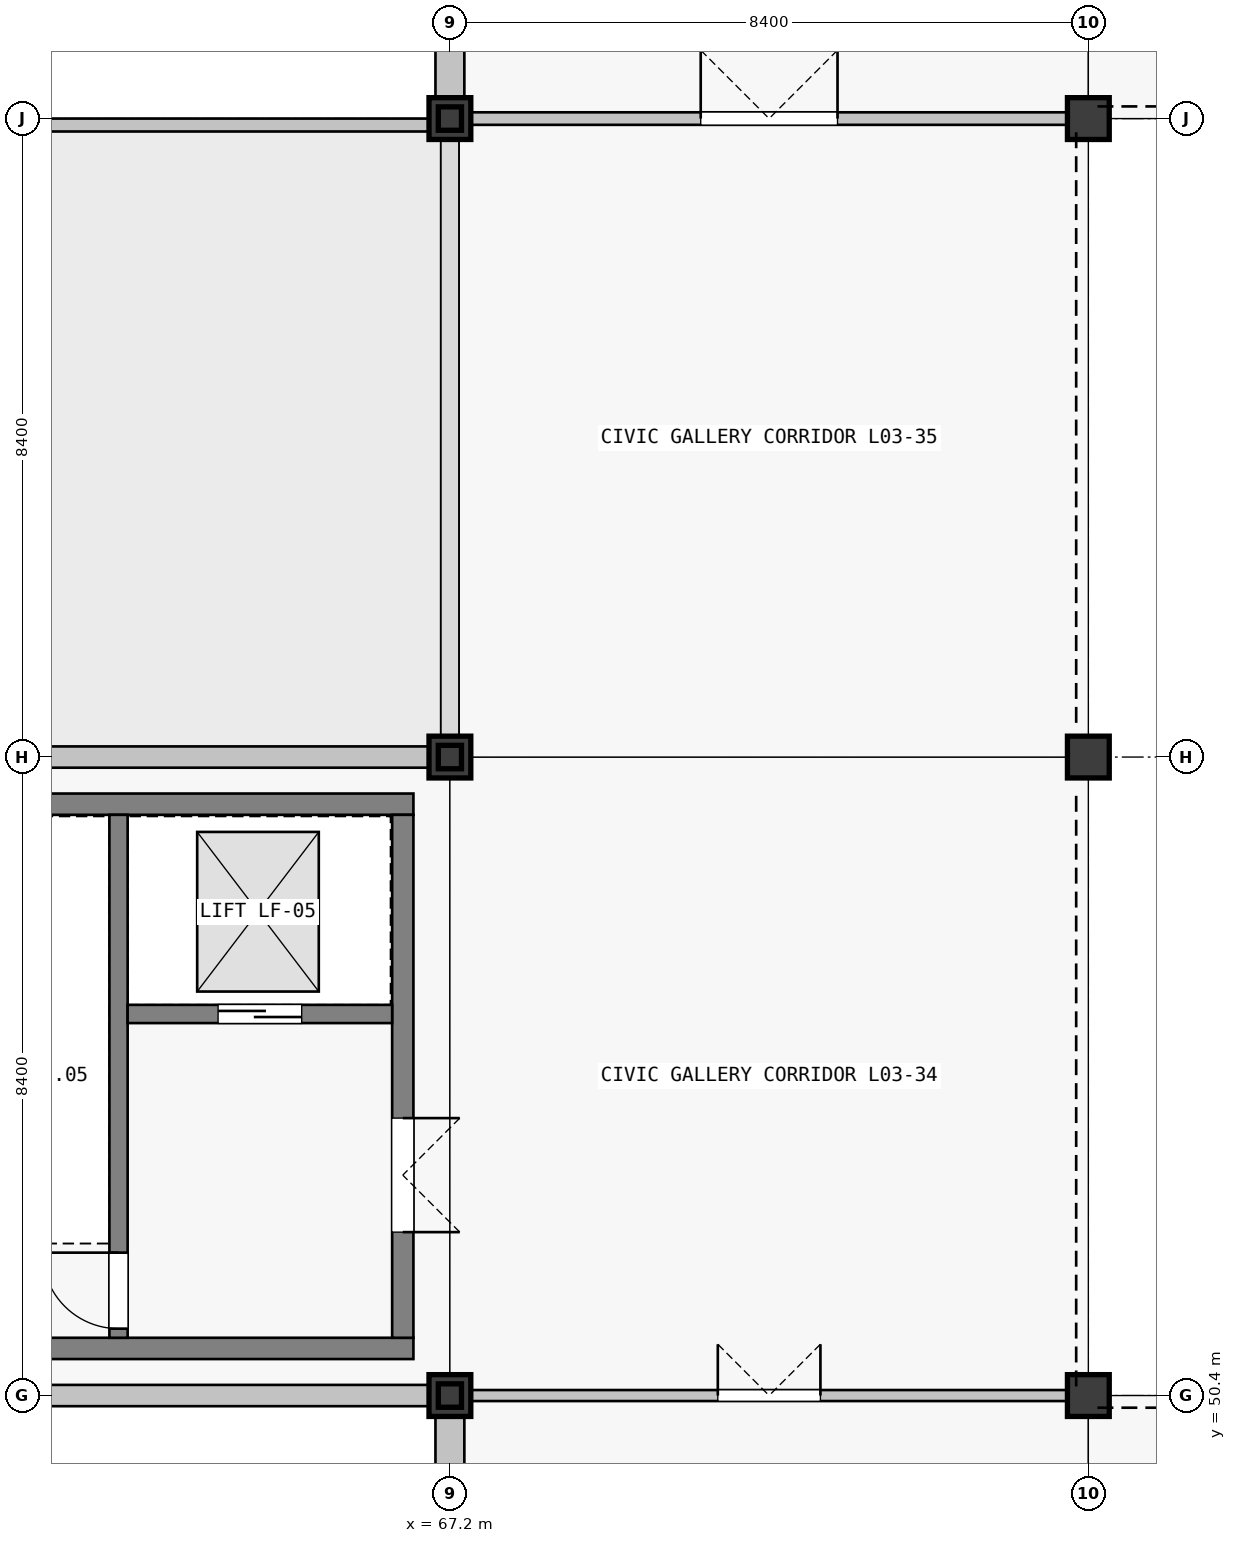
"""IFC4 building model, lengths in metres.
Left out: names, types, materials, properties, quantities, classifications, styles, units other than length and angle.
Written with IfcOpenShell. Run it as: python <this file> out.ifc"""

import sys

from ifc_helpers import new_model, si_unit, direction, frame, frame_2d, origin, origin_2d, place, context, subcontext, project, spatial, rectangle, i_section, extrude, element, fill, save


model = new_model("IFC4")
c1 = context("Model", 3, precision=1e-05, world=origin(), true_north=direction((0.0, 1.0)))
c2 = subcontext(c1, "Body", "Model", "MODEL_VIEW")
j1 = project(units=[si_unit("LENGTHUNIT", "METRE"), si_unit("PLANEANGLEUNIT", "RADIAN")], contexts=[c1])
p1 = place(None, origin())
s1 = spatial("IfcSite", under=j1, at=p1, CompositionType="ELEMENT")
p2 = place(p1, origin())
s2 = spatial("IfcBuilding", under=s1, at=p2, CompositionType="ELEMENT")
p3 = place(p2, frame((0.0, 0.0, 14.76)))
s3 = spatial("IfcBuildingStorey", under=s2, at=p3, CompositionType="ELEMENT", Elevation=14.76)
for number, where, z_axis, x_axis in (
    (1, (67.2, 50.4, 0.0), (0.0, 0.0, 1.0), (1.0, 0.0, 0.0)),
    (2, (67.2, 58.8, 0.0), (0.0, 0.0, 1.0), (1.0, 0.0, 0.0)),
    (3, (67.2, 67.2, 0.0), (0.0, 0.0, 1.0), (1.0, 0.0, 0.0)),
    (4, (75.6, 50.4, 0.0), (0.0, 0.0, 1.0), (1.0, 0.0, 0.0)),
    (5, (75.6, 58.8, 0.0), (0.0, 0.0, 1.0), (1.0, 0.0, 0.0)),
    (6, (75.6, 67.2, 0.0), (0.0, 0.0, 1.0), (1.0, 0.0, 0.0)),
):
    element("IfcColumn", number, at=place(p3, frame(where, z_axis=z_axis, x_axis=x_axis)), inside=s3, PredefinedType="COLUMN", context=c2, shape_type="SweptSolid", body=[
        extrude(rectangle(XDim=0.55, YDim=0.55, at=origin_2d()), origin(), (0.0, 0.0, 1.0), 4.14),
    ])
p4 = place(p3, frame((67.2, 50.4, 4.14), z_axis=(0.0, 0.0, 1.0), x_axis=(1.0, 0.0, 0.0)))
e7 = element("IfcColumn", 7, at=p4, inside=s3, PredefinedType="COLUMN", context=c2, shape_type="SweptSolid", body=[
    extrude(i_section(OverallWidth=0.305, OverallDepth=0.308, WebThickness=0.01, FlangeThickness=0.015, FilletRadius=0.017, at=origin_2d()), origin(), (0.0, 0.0, 1.0), 1.709),
])
p5 = place(p3, frame((67.2, 58.8, 4.14), z_axis=(0.0, 0.0, 1.0), x_axis=(1.0, 0.0, 0.0)))
e8 = element("IfcColumn", 8, at=p5, inside=s3, PredefinedType="COLUMN", context=c2, shape_type="SweptSolid", body=[
    extrude(i_section(OverallWidth=0.305, OverallDepth=0.308, WebThickness=0.01, FlangeThickness=0.015, FilletRadius=0.017, at=origin_2d()), origin(), (0.0, 0.0, 1.0), 2.558),
])
p6 = place(p3, frame((67.2, 67.2, 4.14), z_axis=(0.0, 0.0, 1.0), x_axis=(1.0, 0.0, 0.0)))
e9 = element("IfcColumn", 9, at=p6, inside=s3, PredefinedType="COLUMN", context=c2, shape_type="SweptSolid", body=[
    extrude(i_section(OverallWidth=0.305, OverallDepth=0.308, WebThickness=0.01, FlangeThickness=0.015, FilletRadius=0.017, at=origin_2d()), origin(), (0.0, 0.0, 1.0), 1.709),
])
for number, where, z_axis, x_axis in (
    (10, (66.924, 50.4, 0.0), (0.0, 0.0, 1.0), (-1.0, 0.0, 0.0)),
    (11, (59.076, 58.8, 0.0), (0.0, 0.0, 1.0), (1.0, 0.0, 0.0)),
):
    element("IfcWall", number, at=place(p3, frame(where, z_axis=z_axis, x_axis=x_axis)), inside=s3, PredefinedType="SOLIDWALL", context=c2, shape_type="SweptSolid", body=[
        extrude(rectangle(XDim=7.848, YDim=0.28, at=frame_2d((3.924, 0.0))), origin(), (0.0, 0.0, 1.0), 3.37),
    ])
p7 = place(p3, frame((67.2, 42.276, 0.0), z_axis=(0.0, 0.0, 1.0), x_axis=(0.0, 1.0, 0.0)))
e12 = element("IfcWall", 12, at=p7, inside=s3, PredefinedType="SOLIDWALL", context=c2, shape_type="SweptSolid", body=[
    extrude(rectangle(XDim=7.848, YDim=0.38, at=frame_2d((3.924, 0.0))), origin(), (0.0, 0.0, 1.0), 2.52),
])
p8 = place(p3, frame((67.2, 67.476, 0.0), z_axis=(0.0, 0.0, 1.0), x_axis=(0.0, 1.0, 0.0)))
e13 = element("IfcWall", 13, at=p8, inside=s3, PredefinedType="SOLIDWALL", context=c2, shape_type="SweptSolid", body=[
    extrude(rectangle(XDim=7.848, YDim=0.38, at=frame_2d((3.924, 0.0))), origin(), (0.0, 0.0, 1.0), 2.52),
])
p9 = place(p3, frame((59.06, 67.115, 0.0), z_axis=(0.0, 0.0, 1.0), x_axis=(1.0, 0.0, 0.0)))
e14 = element("IfcWall", 14, at=p9, inside=s3, PredefinedType="PARAPET", context=c2, shape_type="SweptSolid", body=[
    extrude(rectangle(XDim=7.88, YDim=0.17, at=frame_2d((3.94, 0.0))), origin(), (0.0, 0.0, 1.0), 0.95),
])
for number, where, z_axis, x_axis in (
    (15, (66.72, 51.02, 0.0), (0.0, 0.0, 1.0), (-1.0, 0.0, 0.0)),
    (16, (59.28, 58.18, 0.0), (0.0, 0.0, 1.0), (1.0, 0.0, 0.0)),
):
    element("IfcWall", number, at=place(p3, frame(where, z_axis=z_axis, x_axis=x_axis)), inside=s3, PredefinedType="SHEAR", context=c2, shape_type="SweptSolid", body=[
        extrude(rectangle(XDim=7.44, YDim=0.28, at=frame_2d((3.72, 0.0))), origin(), (0.0, 0.0, 1.0), 4.07),
    ])
p10 = place(p3, frame((66.58, 58.04, 0.0), z_axis=(0.0, 0.0, 1.0), x_axis=(0.0, -1.0, 0.0)))
e17 = element("IfcWall", 17, at=p10, inside=s3, PredefinedType="SHEAR", context=c2, shape_type="SweptSolid", body=[
    extrude(rectangle(XDim=6.88, YDim=0.28, at=frame_2d((3.44, 0.0))), origin(), (0.0, 0.0, 1.0), 4.07),
])
p11 = place(p10, frame((3.99, 0.0, 0.0)))
e18 = element("IfcOpeningElement", 18, at=p11, cuts=e17, PredefinedType="OPENING", context=c2, shape_type="SweptSolid", body=[
    extrude(rectangle(XDim=1.5, YDim=2.15, at=frame_2d((0.75, 1.075))), frame((0.0, 0.14, 0.0), z_axis=(0.0, -1.0, 0.0), x_axis=(1.0, 0.0, 0.0)), (0.0, 0.0, 1.0), 0.28),
])
p12 = place(p3, frame((62.84, 51.16, 0.0), z_axis=(0.0, 0.0, 1.0), x_axis=(0.0, 1.0, 0.0)))
e19 = element("IfcWall", 19, at=p12, inside=s3, PredefinedType="SHEAR", context=c2, shape_type="SweptSolid", body=[
    extrude(rectangle(XDim=6.88, YDim=0.24, at=frame_2d((3.44, 0.0))), origin(), (0.0, 0.0, 1.0), 4.07),
])
p13 = place(p12, frame((0.12, 0.0, 0.0)))
e20 = element("IfcOpeningElement", 20, at=p13, cuts=e19, PredefinedType="OPENING", context=c2, shape_type="SweptSolid", body=[
    extrude(rectangle(XDim=1.0, YDim=2.15, at=frame_2d((0.5, 1.075))), frame((0.0, 0.12, 0.0), z_axis=(0.0, -1.0, 0.0), x_axis=(1.0, 0.0, 0.0)), (0.0, 0.0, 1.0), 0.24),
])
p14 = place(p3, frame((62.96, 55.42, 0.0), z_axis=(0.0, 0.0, 1.0), x_axis=(1.0, 0.0, 0.0)))
e21 = element("IfcWall", 21, at=p14, inside=s3, PredefinedType="SHEAR", context=c2, shape_type="SweptSolid", body=[
    extrude(rectangle(XDim=3.48, YDim=0.24, at=frame_2d((1.74, 0.0))), origin(), (0.0, 0.0, 1.0), 4.07),
])
p15 = place(p14, frame((1.19, 0.0, 0.0)))
e22 = element("IfcOpeningElement", 22, at=p15, cuts=e21, PredefinedType="OPENING", context=c2, shape_type="SweptSolid", body=[
    extrude(rectangle(XDim=1.1, YDim=2.15, at=frame_2d((0.55, 1.075))), frame((0.0, 0.12, 0.0), z_axis=(0.0, -1.0, 0.0), x_axis=(1.0, 0.0, 0.0)), (0.0, 0.0, 1.0), 0.24),
])
p16 = place(p3, frame((67.477, 50.4, 0.0), z_axis=(0.0, 0.0, 1.0), x_axis=(1.0, 0.0, 0.0)))
e23 = element("IfcWall", 23, at=p16, inside=s3, PredefinedType="PARTITIONING", context=c2, shape_type="SweptSolid", body=[
    extrude(rectangle(XDim=7.846, YDim=0.145, at=frame_2d((3.923, 0.0))), origin(), (0.0, 0.0, 1.0), 3.19),
])
p17 = place(p16, frame((3.248, 0.0, 0.0)))
e24 = element("IfcOpeningElement", 24, at=p17, cuts=e23, PredefinedType="OPENING", context=c2, shape_type="SweptSolid", body=[
    extrude(rectangle(XDim=1.35, YDim=2.2, at=frame_2d((0.675, 1.1))), frame((0.0, 0.073, 0.0), z_axis=(0.0, -1.0, 0.0), x_axis=(1.0, 0.0, 0.0)), (0.0, 0.0, 1.0), 0.145),
])
p18 = place(p3, frame((67.477, 67.2, 0.0), z_axis=(0.0, 0.0, 1.0), x_axis=(1.0, 0.0, 0.0)))
e25 = element("IfcWall", 25, at=p18, inside=s3, PredefinedType="PARTITIONING", context=c2, shape_type="SweptSolid", body=[
    extrude(rectangle(XDim=7.846, YDim=0.165, at=frame_2d((3.923, 0.0))), origin(), (0.0, 0.0, 1.0), 3.19),
])
p19 = place(p18, frame((3.023, 0.0, 0.0)))
e26 = element("IfcOpeningElement", 26, at=p19, cuts=e25, PredefinedType="OPENING", context=c2, shape_type="SweptSolid", body=[
    extrude(rectangle(XDim=1.8, YDim=2.4, at=frame_2d((0.9, 1.2))), frame((0.0, 0.083, 0.0), z_axis=(0.0, -1.0, 0.0), x_axis=(1.0, 0.0, 0.0)), (0.0, 0.0, 1.0), 0.165),
])
p20 = place(p13, origin())
e27 = element("IfcDoor", 27, at=p20, inside=s3, OperationType="SINGLE_SWING_RIGHT", PredefinedType="DOOR", context=c2, shape_type="SweptSolid", body=[
    extrude(rectangle(XDim=1.0, YDim=2.15, at=frame_2d((0.5, 1.075))), frame((0.0, 0.025, 0.0), z_axis=(0.0, -1.0, 0.0), x_axis=(1.0, 0.0, 0.0)), (0.0, 0.0, 1.0), 0.05),
])
fill(e20, e27)
p21 = place(p11, origin())
e28 = element("IfcDoor", 28, at=p21, inside=s3, OperationType="DOUBLE_DOOR_SINGLE_SWING", PredefinedType="DOOR", context=c2, shape_type="SweptSolid", body=[
    extrude(rectangle(XDim=1.5, YDim=2.15, at=frame_2d((0.75, 1.075))), frame((0.0, 0.025, 0.0), z_axis=(0.0, -1.0, 0.0), x_axis=(1.0, 0.0, 0.0)), (0.0, 0.0, 1.0), 0.05),
])
fill(e18, e28)
p22 = place(p15, origin())
e29 = element("IfcDoor", 29, at=p22, inside=s3, OperationType="DOUBLE_DOOR_SLIDING", PredefinedType="DOOR", context=c2, shape_type="SweptSolid", body=[
    extrude(rectangle(XDim=1.1, YDim=2.15, at=frame_2d((0.55, 1.075))), frame((0.0, 0.025, 0.0), z_axis=(0.0, -1.0, 0.0), x_axis=(1.0, 0.0, 0.0)), (0.0, 0.0, 1.0), 0.05),
])
fill(e22, e29)
p23 = place(p17, origin())
e30 = element("IfcDoor", 30, at=p23, inside=s3, OperationType="DOUBLE_DOOR_SINGLE_SWING", PredefinedType="DOOR", context=c2, shape_type="SweptSolid", body=[
    extrude(rectangle(XDim=1.35, YDim=2.2, at=frame_2d((0.675, 1.1))), frame((0.0, 0.025, 0.0), z_axis=(0.0, -1.0, 0.0), x_axis=(1.0, 0.0, 0.0)), (0.0, 0.0, 1.0), 0.05),
])
fill(e24, e30)
p24 = place(p19, origin())
e31 = element("IfcDoor", 31, at=p24, inside=s3, OperationType="DOUBLE_DOOR_SINGLE_SWING", PredefinedType="DOOR", context=c2, shape_type="SweptSolid", body=[
    extrude(rectangle(XDim=1.8, YDim=2.4, at=frame_2d((0.9, 1.2))), frame((0.0, 0.025, 0.0), z_axis=(0.0, -1.0, 0.0), x_axis=(1.0, 0.0, 0.0)), (0.0, 0.0, 1.0), 0.05),
])
fill(e26, e31)
save(model, sys.argv[1])
